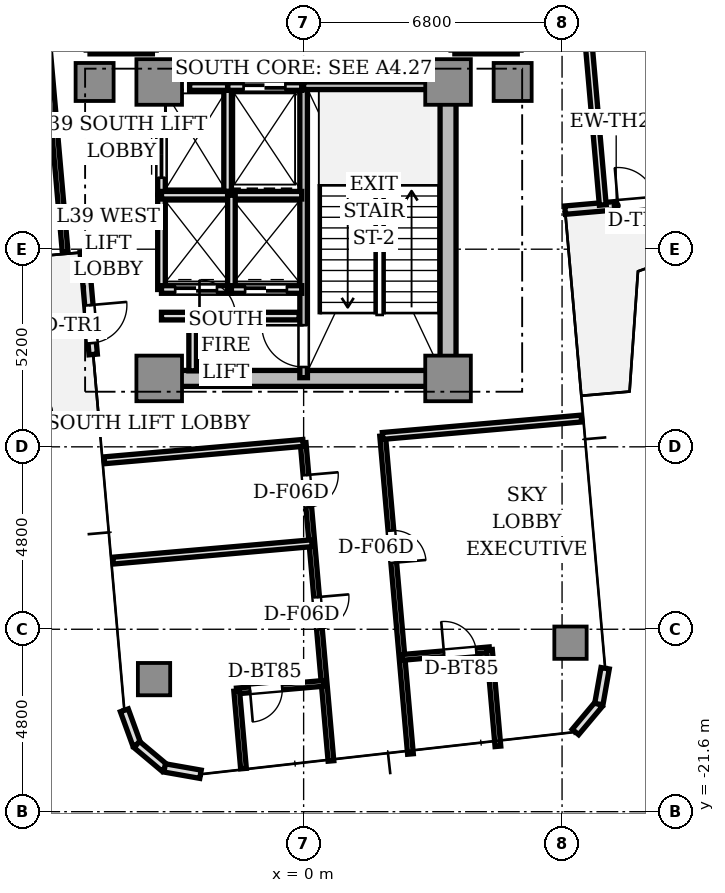
"""IFC4 building model, lengths in metres.
Left out: names, types, materials, properties, quantities, classifications, styles, units other than length and angle.
Written with IfcOpenShell. Run it as: python <this file> out.ifc"""

import sys

from ifc_helpers import new_model, si_unit, direction, frame, frame_2d, origin, origin_2d, place, context, subcontext, project, spatial, rectangle, extrude, source, transform, mapped, element, fill, save


model = new_model("IFC4")
c1 = context("Model", 3, precision=1e-05, world=origin(), true_north=direction((0.0, 1.0)))
c2 = subcontext(c1, "Body", "Model", "MODEL_VIEW")
j1 = project(units=[si_unit("LENGTHUNIT", "METRE"), si_unit("PLANEANGLEUNIT", "RADIAN")], contexts=[c1])
p1 = place(None, origin())
s1 = spatial("IfcSite", under=j1, at=p1, CompositionType="ELEMENT")
p2 = place(p1, origin())
s2 = spatial("IfcBuilding", under=s1, at=p2, CompositionType="ELEMENT")
p3 = place(p2, frame((0.0, 0.0, 142.75)))
s3 = spatial("IfcBuildingStorey", under=s2, at=p3, CompositionType="ELEMENT", Elevation=142.75)
p4 = place(p3, frame((-3.55, -10.2, 0.0), z_axis=(0.0, 0.0, 1.0), x_axis=(1.0, 0.0, 0.0)))
e1 = element("IfcWall", 1, at=p4, inside=s3, PredefinedType="SHEAR", context=c2, shape_type="SweptSolid", body=[
    extrude(rectangle(XDim=7.1, YDim=0.42, at=frame_2d((3.55, 0.0))), origin(), (0.0, 0.0, 1.0), 4.26),
])
p5 = place(p3, frame((3.8, -9.75, 0.0), z_axis=(0.0, 0.0, 1.0), x_axis=(0.0, 1.0, 0.0)))
e2 = element("IfcWall", 2, at=p5, inside=s3, PredefinedType="SHEAR", context=c2, shape_type="SweptSolid", body=[
    extrude(rectangle(XDim=6.9, YDim=0.42, at=frame_2d((3.45, 0.0))), origin(), (0.0, 0.0, 1.0), 4.26),
])
m1 = source(origin(), c2, "Body", "SweptSolid", [
    extrude(rectangle(XDim=1.2, YDim=1.2, at=origin_2d()), origin(), (0.0, 0.0, 1.0), 4.26),
])
for number, where, z_axis, x_axis in (
    (3, (-3.8, -2.4, 0.0), (0.0, 0.0, 1.0), (1.0, 0.0, 0.0)),
    (4, (3.8, -2.4, 0.0), (0.0, 0.0, 1.0), (1.0, 0.0, 0.0)),
    (5, (-3.8, -10.2, 0.0), (0.0, 0.0, 1.0), (1.0, 0.0, 0.0)),
    (6, (3.8, -10.2, 0.0), (0.0, 0.0, 1.0), (1.0, 0.0, 0.0)),
):
    element("IfcColumn", number, at=place(p3, frame(where, z_axis=z_axis, x_axis=x_axis)), inside=s3, PredefinedType="COLUMN", context=c2, shape_type="MappedRepresentation", body=[
        mapped(m1, transform((0.0, 0.0, 0.0), scale=1.0)),
    ])
m2 = source(origin(), c2, "Body", "SweptSolid", [
    extrude(rectangle(XDim=1.0, YDim=1.0, at=origin_2d()), origin(), (0.0, 0.0, 1.0), 4.26),
])
for number, where, z_axis, x_axis in (
    (7, (5.5, -2.4, 0.0), (0.0, 0.0, 1.0), (1.0, 0.0, 0.0)),
    (8, (-5.5, -2.4, 0.0), (0.0, 0.0, 1.0), (1.0, 0.0, 0.0)),
):
    element("IfcColumn", number, at=place(p3, frame(where, z_axis=z_axis, x_axis=x_axis)), inside=s3, PredefinedType="COLUMN", context=c2, shape_type="MappedRepresentation", body=[
        mapped(m2, transform((0.0, 0.0, 0.0), scale=1.0)),
    ])
m3 = source(origin(), c2, "Body", "SweptSolid", [
    extrude(rectangle(XDim=0.85, YDim=0.85, at=origin_2d()), origin(), (0.0, 0.0, 1.0), 4.26),
])
for number, where, z_axis, x_axis in (
    (9, (-3.936, -18.112, 0.0), (0.0, 0.0, 1.0), (1.0, 0.0, 0.0)),
    (10, (7.022, -17.153, 0.0), (0.0, 0.0, 1.0), (1.0, 0.0, 0.0)),
):
    element("IfcColumn", number, at=place(p3, frame(where, z_axis=z_axis, x_axis=x_axis)), inside=s3, PredefinedType="COLUMN", context=c2, shape_type="MappedRepresentation", body=[
        mapped(m3, transform((0.0, 0.0, 0.0), scale=1.0)),
    ])
p6 = place(p3, frame((6.879, -5.772, 0.0), z_axis=(0.0, 0.0, 1.0), x_axis=(0.996193619346, 0.087168071984, 0.0)))
e11 = element("IfcWall", 11, at=p6, inside=s3, PredefinedType="STANDARD", context=c2, shape_type="SweptSolid", body=[
    extrude(rectangle(XDim=2.7, YDim=0.22, at=frame_2d((1.35, 0.0))), origin(), (0.0, 0.0, 1.0), 4.26),
])
p7 = place(p6, frame((1.4, 0.0, 0.0)))
e12 = element("IfcOpeningElement", 12, at=p7, cuts=e11, PredefinedType="OPENING", context=c2, shape_type="SweptSolid", body=[
    extrude(rectangle(XDim=1.0, YDim=2.2, at=frame_2d((0.5, 1.1))), frame((0.0, 0.12, 0.0), z_axis=(0.0, -1.0, 0.0), x_axis=(1.0, 0.0, 0.0)), (0.0, 0.0, 1.0), 0.24),
])
p8 = place(p3, frame((-5.772, -6.879, 0.0), z_axis=(0.0, 0.0, 1.0), x_axis=(0.087168071984, -0.996193619346, 0.0)))
e13 = element("IfcWall", 13, at=p8, inside=s3, PredefinedType="STANDARD", context=c2, shape_type="SweptSolid", body=[
    extrude(rectangle(XDim=2.7, YDim=0.22, at=frame_2d((1.35, 0.0))), origin(), (0.0, 0.0, 1.0), 4.26),
])
p9 = place(p8, frame((1.4, 0.0, 0.0)))
e14 = element("IfcOpeningElement", 14, at=p9, cuts=e13, PredefinedType="OPENING", context=c2, shape_type="SweptSolid", body=[
    extrude(rectangle(XDim=1.0, YDim=2.2, at=frame_2d((0.5, 1.1))), frame((0.0, 0.12, 0.0), z_axis=(0.0, -1.0, 0.0), x_axis=(1.0, 0.0, 0.0)), (0.0, 0.0, 1.0), 0.24),
])
p10 = place(p3, frame((-4.718, -18.933, 0.0), z_axis=(0.0, 0.0, 1.0), x_axis=(0.34188635151, -0.939741306239, 0.0)))
e15 = element("IfcWall", 15, at=p10, inside=s3, PredefinedType="STANDARD", context=c2, shape_type="SweptSolid", body=[
    extrude(rectangle(XDim=0.958, YDim=0.22, at=frame_2d((0.479, 0.0))), origin(), (0.0, 0.0, 1.0), 4.26),
])
for number, where, z_axis, x_axis in (
    (16, (-4.39, -19.833, 0.0), (0.0, 0.0, 1.0), (0.766, -0.643, 0.0)),
    (17, (-3.657, -20.449, 0.0), (0.0, 0.0, 1.0), (0.985, -0.174, 0.0)),
):
    element("IfcWall", number, at=place(p3, frame(where, z_axis=z_axis, x_axis=x_axis)), inside=s3, PredefinedType="STANDARD", context=c2, shape_type="SweptSolid", body=[
        extrude(rectangle(XDim=0.958, YDim=0.22, at=frame_2d((0.479, 0.0))), origin(), (0.0, 0.0, 1.0), 4.26),
    ])
for number, where, z_axis, x_axis in (
    (18, (7.152, -19.503, 0.0), (0.0, 0.0, 1.0), (0.643, 0.766, 0.0)),
    (19, (7.768, -18.769, 0.0), (0.0, 0.0, 1.0), (0.174, 0.985, 0.0)),
):
    element("IfcWall", number, at=place(p3, frame(where, z_axis=z_axis, x_axis=x_axis)), inside=s3, PredefinedType="STANDARD", context=c2, shape_type="SweptSolid", body=[
        extrude(rectangle(XDim=0.958, YDim=0.22, at=frame_2d((0.479, 0.0))), origin(), (0.0, 0.0, 1.0), 4.26),
    ])
p11 = place(p3, frame((0.0, -10.18, 0.0), z_axis=(0.0, 0.0, 1.0), x_axis=(0.0, 1.0, 0.0)))
e20 = element("IfcWall", 20, at=p11, inside=s3, PredefinedType="SOLIDWALL", context=c2, shape_type="SweptSolid", body=[
    extrude(rectangle(XDim=7.68, YDim=0.2, at=frame_2d((3.84, 0.0))), origin(), (0.0, 0.0, 1.0), 4.26),
])
p12 = place(p11, frame((0.28, 0.0, 0.0)))
e21 = element("IfcOpeningElement", 21, at=p12, cuts=e20, PredefinedType="OPENING", context=c2, shape_type="SweptSolid", body=[
    extrude(rectangle(XDim=1.1, YDim=2.15, at=frame_2d((0.55, 1.075))), frame((0.0, 0.11, 0.0), z_axis=(0.0, -1.0, 0.0), x_axis=(1.0, 0.0, 0.0)), (0.0, 0.0, 1.0), 0.22),
])
p13 = place(p3, frame((0.0, -2.5, 0.0), z_axis=(0.0, 0.0, 1.0), x_axis=(1.0, 0.0, 0.0)))
e22 = element("IfcWall", 22, at=p13, inside=s3, PredefinedType="SOLIDWALL", context=c2, shape_type="SweptSolid", body=[
    extrude(rectangle(XDim=3.72, YDim=0.2, at=frame_2d((1.86, 0.0))), origin(), (0.0, 0.0, 1.0), 4.26),
])
p14 = place(p3, frame((-2.0, -5.28, 0.0), z_axis=(0.0, 0.0, 1.0), x_axis=(0.0, 1.0, 0.0)))
e23 = element("IfcWall", 23, at=p14, inside=s3, PredefinedType="SOLIDWALL", context=c2, shape_type="SweptSolid", body=[
    extrude(rectangle(XDim=2.78, YDim=0.2, at=frame_2d((1.39, 0.0))), origin(), (0.0, 0.0, 1.0), 3.81),
])
p15 = place(p3, frame((-2.0, -2.52, 0.0), z_axis=(0.0, 0.0, 1.0), x_axis=(1.0, 0.0, 0.0)))
e24 = element("IfcWall", 24, at=p15, inside=s3, PredefinedType="SOLIDWALL", context=c2, shape_type="SweptSolid", body=[
    extrude(rectangle(XDim=1.95, YDim=0.2, at=frame_2d((0.975, 0.0))), origin(), (0.0, 0.0, 1.0), 3.81),
])
p16 = place(p15, frame((0.42, 0.0, 0.0)))
e25 = element("IfcOpeningElement", 25, at=p16, cuts=e24, PredefinedType="OPENING", context=c2, shape_type="SweptSolid", body=[
    extrude(rectangle(XDim=1.1, YDim=2.2, at=frame_2d((0.55, 1.1))), frame((0.0, 0.11, 0.0), z_axis=(0.0, -1.0, 0.0), x_axis=(1.0, 0.0, 0.0)), (0.0, 0.0, 1.0), 0.22),
])
p17 = place(p3, frame((-3.0, -2.52, 0.0), z_axis=(0.0, 0.0, 1.0), x_axis=(1.0, 0.0, 0.0)))
e26 = element("IfcWall", 26, at=p17, inside=s3, PredefinedType="SOLIDWALL", context=c2, shape_type="SweptSolid", body=[
    extrude(rectangle(XDim=1.0, YDim=0.2, at=frame_2d((0.5, 0.0))), origin(), (0.0, 0.0, 1.0), 3.81),
])
p18 = place(p3, frame((-3.74, -5.36, 0.0), z_axis=(0.0, 0.0, 1.0), x_axis=(0.0, 1.0, 0.0)))
e27 = element("IfcWall", 27, at=p18, inside=s3, PredefinedType="SOLIDWALL", context=c2, shape_type="SweptSolid", body=[
    extrude(rectangle(XDim=2.08, YDim=0.2, at=frame_2d((1.04, 0.0))), origin(), (0.0, 0.0, 1.0), 3.81),
])
p19 = place(p18, frame((0.44, 0.0, 0.0)))
e28 = element("IfcOpeningElement", 28, at=p19, cuts=e27, PredefinedType="OPENING", context=c2, shape_type="SweptSolid", body=[
    extrude(rectangle(XDim=1.2, YDim=2.2, at=frame_2d((0.6, 1.1))), frame((0.0, 0.11, 0.0), z_axis=(0.0, -1.0, 0.0), x_axis=(1.0, 0.0, 0.0)), (0.0, 0.0, 1.0), 0.22),
])
p20 = place(p3, frame((-3.74, -7.86, 0.0), z_axis=(0.0, 0.0, 1.0), x_axis=(0.0, 1.0, 0.0)))
e29 = element("IfcWall", 29, at=p20, inside=s3, PredefinedType="SOLIDWALL", context=c2, shape_type="SweptSolid", body=[
    extrude(rectangle(XDim=2.48, YDim=0.2, at=frame_2d((1.24, 0.0))), origin(), (0.0, 0.0, 1.0), 3.81),
])
p21 = place(p3, frame((-3.74, -7.86, 0.0), z_axis=(0.0, 0.0, 1.0), x_axis=(1.0, 0.0, 0.0)))
e30 = element("IfcWall", 30, at=p21, inside=s3, PredefinedType="SOLIDWALL", context=c2, shape_type="SweptSolid", body=[
    extrude(rectangle(XDim=1.84, YDim=0.2, at=frame_2d((0.92, 0.0))), origin(), (0.0, 0.0, 1.0), 3.81),
])
p22 = place(p21, frame((0.36, 0.0, 0.0)))
e31 = element("IfcOpeningElement", 31, at=p22, cuts=e30, PredefinedType="OPENING", context=c2, shape_type="SweptSolid", body=[
    extrude(rectangle(XDim=1.1, YDim=2.2, at=frame_2d((0.55, 1.1))), frame((0.0, 0.11, 0.0), z_axis=(0.0, -1.0, 0.0), x_axis=(1.0, 0.0, 0.0)), (0.0, 0.0, 1.0), 0.22),
])
p23 = place(p3, frame((-3.74, -5.38, 0.0), z_axis=(0.0, 0.0, 1.0), x_axis=(1.0, 0.0, 0.0)))
e32 = element("IfcWall", 32, at=p23, inside=s3, PredefinedType="SOLIDWALL", context=c2, shape_type="SweptSolid", body=[
    extrude(rectangle(XDim=3.69, YDim=0.2, at=frame_2d((1.845, 0.0))), origin(), (0.0, 0.0, 1.0), 3.81),
])
p24 = place(p3, frame((-1.9, -7.86, 0.0), z_axis=(0.0, 0.0, 1.0), x_axis=(0.0, 1.0, 0.0)))
e33 = element("IfcWall", 33, at=p24, inside=s3, PredefinedType="SOLIDWALL", context=c2, shape_type="SweptSolid", body=[
    extrude(rectangle(XDim=2.48, YDim=0.2, at=frame_2d((1.24, 0.0))), origin(), (0.0, 0.0, 1.0), 3.81),
])
p25 = place(p3, frame((-1.9, -7.86, 0.0), z_axis=(0.0, 0.0, 1.0), x_axis=(1.0, 0.0, 0.0)))
e34 = element("IfcWall", 34, at=p25, inside=s3, PredefinedType="SOLIDWALL", context=c2, shape_type="SweptSolid", body=[
    extrude(rectangle(XDim=1.85, YDim=0.2, at=frame_2d((0.925, 0.0))), origin(), (0.0, 0.0, 1.0), 3.81),
])
p26 = place(p25, frame((0.36, 0.0, 0.0)))
e35 = element("IfcOpeningElement", 35, at=p26, cuts=e34, PredefinedType="OPENING", context=c2, shape_type="SweptSolid", body=[
    extrude(rectangle(XDim=1.1, YDim=2.2, at=frame_2d((0.55, 1.1))), frame((0.0, 0.11, 0.0), z_axis=(0.0, -1.0, 0.0), x_axis=(1.0, 0.0, 0.0)), (0.0, 0.0, 1.0), 0.22),
])
for number, where, z_axis, x_axis in (
    (36, (3.98, -1.56, 0.0), (0.0, 0.0, 1.0), (1.0, 0.0, 0.0)),
    (37, (-5.62, -1.56, 0.0), (0.0, 0.0, 1.0), (1.0, 0.0, 0.0)),
):
    element("IfcWall", number, at=place(p3, frame(where, z_axis=z_axis, x_axis=x_axis)), inside=s3, PredefinedType="SOLIDWALL", context=c2, shape_type="SweptSolid", body=[
        extrude(rectangle(XDim=1.64, YDim=0.2, at=frame_2d((0.82, 0.0))), origin(), (0.0, 0.0, 1.0), 3.81),
    ])
p27 = place(p3, frame((-3.74, -8.56, 0.0), z_axis=(0.0, 0.0, 1.0), x_axis=(1.0, 0.0, 0.0)))
e38 = element("IfcWall", 38, at=p27, inside=s3, PredefinedType="SOLIDWALL", context=c2, shape_type="SweptSolid", body=[
    extrude(rectangle(XDim=3.62, YDim=0.2, at=frame_2d((1.81, 0.0))), origin(), (0.0, 0.0, 1.0), 3.81),
])
p28 = place(p27, frame((1.0, 0.0, 0.0)))
e39 = element("IfcOpeningElement", 39, at=p28, cuts=e38, PredefinedType="OPENING", context=c2, shape_type="SweptSolid", body=[
    extrude(rectangle(XDim=0.95, YDim=2.15, at=frame_2d((0.475, 1.075))), frame((0.0, 0.11, 0.0), z_axis=(0.0, -1.0, 0.0), x_axis=(1.0, 0.0, 0.0)), (0.0, 0.0, 1.0), 0.22),
])
p29 = place(p3, frame((-2.92, -10.0, 0.0), z_axis=(0.0, 0.0, 1.0), x_axis=(0.0, 1.0, 0.0)))
e40 = element("IfcWall", 40, at=p29, inside=s3, PredefinedType="SOLIDWALL", context=c2, shape_type="SweptSolid", body=[
    extrude(rectangle(XDim=1.44, YDim=0.2, at=frame_2d((0.72, 0.0))), origin(), (0.0, 0.0, 1.0), 3.81),
])
p30 = place(p3, frame((7.871, -5.635, 0.0), z_axis=(0.0, 0.0, 1.0), x_axis=(-0.087147336495, 0.996195433508, 0.0)))
e41 = element("IfcWall", 41, at=p30, inside=s3, PredefinedType="PARTITIONING", context=c2, shape_type="SweptSolid", body=[
    extrude(rectangle(XDim=5.25, YDim=0.18, at=frame_2d((2.625, 0.0))), origin(), (0.0, 0.0, 1.0), 3.81),
])
p31 = place(p3, frame((-7.373, 5.679, 0.0), z_axis=(0.0, 0.0, 1.0), x_axis=(0.087154691724, -0.996194790044, 0.0)))
e42 = element("IfcWall", 42, at=p31, inside=s3, PredefinedType="PARTITIONING", context=c2, shape_type="SweptSolid", body=[
    extrude(rectangle(XDim=12.6, YDim=0.15, at=frame_2d((6.3, 0.0))), origin(), (0.0, 0.0, 1.0), 3.81),
])
p32 = place(p31, frame((5.5, 0.0, 0.0)))
e43 = element("IfcOpeningElement", 43, at=p32, cuts=e42, PredefinedType="OPENING", context=c2, shape_type="SweptSolid", body=[
    extrude(rectangle(XDim=1.6, YDim=2.25, at=frame_2d((0.8, 1.125))), frame((0.0, 0.085, 0.0), z_axis=(0.0, -1.0, 0.0), x_axis=(1.0, 0.0, 0.0)), (0.0, 0.0, 1.0), 0.17),
])
p33 = place(p3, frame((2.079, -11.713, 0.0), z_axis=(0.0, 0.0, 1.0), x_axis=(0.087136303517, -0.996196398613, 0.0)))
e44 = element("IfcWall", 44, at=p33, inside=s3, PredefinedType="PARTITIONING", context=c2, shape_type="SweptSolid", body=[
    extrude(rectangle(XDim=8.4, YDim=0.15, at=frame_2d((4.2, 0.0))), origin(), (0.0, 0.0, 1.0), 3.81),
])
p34 = place(p33, frame((2.5, 0.0, 0.0)))
e45 = element("IfcOpeningElement", 45, at=p34, cuts=e44, PredefinedType="OPENING", context=c2, shape_type="SweptSolid", body=[
    extrude(rectangle(XDim=0.85, YDim=2.1, at=frame_2d((0.425, 1.05))), frame((0.0, 0.085, 0.0), z_axis=(0.0, -1.0, 0.0), x_axis=(1.0, 0.0, 0.0)), (0.0, 0.0, 1.0), 0.17),
])
p35 = place(p3, frame((-0.013, -11.896, 0.0), z_axis=(0.0, 0.0, 1.0), x_axis=(0.087165147537, -0.996193875235, 0.0)))
e46 = element("IfcWall", 46, at=p35, inside=s3, PredefinedType="PARTITIONING", context=c2, shape_type="SweptSolid", body=[
    extrude(rectangle(XDim=8.4, YDim=0.15, at=frame_2d((4.2, 0.0))), origin(), (0.0, 0.0, 1.0), 3.81),
])
p36 = place(p35, frame((0.85, 0.0, 0.0)))
e47 = element("IfcOpeningElement", 47, at=p36, cuts=e46, PredefinedType="OPENING", context=c2, shape_type="SweptSolid", body=[
    extrude(rectangle(XDim=0.85, YDim=2.1, at=frame_2d((0.425, 1.05))), frame((0.0, 0.085, 0.0), z_axis=(0.0, -1.0, 0.0), x_axis=(1.0, 0.0, 0.0)), (0.0, 0.0, 1.0), 0.17),
])
p37 = place(p35, frame((4.075, 0.0, 0.0)))
e48 = element("IfcOpeningElement", 48, at=p37, cuts=e46, PredefinedType="OPENING", context=c2, shape_type="SweptSolid", body=[
    extrude(rectangle(XDim=0.85, YDim=2.1, at=frame_2d((0.425, 1.05))), frame((0.0, 0.085, 0.0), z_axis=(0.0, -1.0, 0.0), x_axis=(1.0, 0.0, 0.0)), (0.0, 0.0, 1.0), 0.17),
])
for number, where, z_axis, x_axis in (
    (49, (2.079, -11.713, 0.0), (0.0, 0.0, 1.0), (0.996, 0.087, 0.0)),
    (50, (-5.243, -12.354, 0.0), (0.0, 0.0, 1.0), (0.996, 0.087, 0.0)),
):
    element("IfcWall", number, at=place(p3, frame(where, z_axis=z_axis, x_axis=x_axis)), inside=s3, PredefinedType="PARTITIONING", context=c2, shape_type="SweptSolid", body=[
        extrude(rectangle(XDim=5.25, YDim=0.18, at=frame_2d((2.625, 0.0))), origin(), (0.0, 0.0, 1.0), 3.78),
    ])
p38 = place(p3, frame((2.589, -17.541, 0.0), z_axis=(0.0, 0.0, 1.0), x_axis=(0.99620082659, 0.087085665299, 0.0)))
e51 = element("IfcWall", 51, at=p38, inside=s3, PredefinedType="PARTITIONING", context=c2, shape_type="SweptSolid", body=[
    extrude(rectangle(XDim=2.31, YDim=0.15, at=frame_2d((1.155, 0.0))), origin(), (0.0, 0.0, 1.0), 3.78),
])
p39 = place(p38, frame((1.11, 0.0, 0.0)))
e52 = element("IfcOpeningElement", 52, at=p39, cuts=e51, PredefinedType="OPENING", context=c2, shape_type="SweptSolid", body=[
    extrude(rectangle(XDim=0.85, YDim=2.1, at=frame_2d((0.425, 1.05))), frame((0.0, 0.085, 0.0), z_axis=(0.0, -1.0, 0.0), x_axis=(1.0, 0.0, 0.0)), (0.0, 0.0, 1.0), 0.17),
])
p40 = place(p3, frame((4.89, -17.34, 0.0), z_axis=(0.0, 0.0, 1.0), x_axis=(0.087125381265, -0.996197353911, 0.0)))
e53 = element("IfcWall", 53, at=p40, inside=s3, PredefinedType="PARTITIONING", context=c2, shape_type="SweptSolid", body=[
    extrude(rectangle(XDim=2.55, YDim=0.15, at=frame_2d((1.275, 0.0))), origin(), (0.0, 0.0, 1.0), 3.81),
])
p41 = place(p3, frame((0.218, -14.536, 0.0), z_axis=(0.0, 0.0, 1.0), x_axis=(-0.996195433508, -0.087147336495, 0.0)))
e54 = element("IfcWall", 54, at=p41, inside=s3, PredefinedType="PARTITIONING", context=c2, shape_type="SweptSolid", body=[
    extrude(rectangle(XDim=5.25, YDim=0.18, at=frame_2d((2.625, 0.0))), origin(), (0.0, 0.0, 1.0), 3.81),
])
p42 = place(p3, frame((0.54, -18.222, 0.0), z_axis=(0.0, 0.0, 1.0), x_axis=(-0.99620082659, -0.087085665299, 0.0)))
e55 = element("IfcWall", 55, at=p42, inside=s3, PredefinedType="PARTITIONING", context=c2, shape_type="SweptSolid", body=[
    extrude(rectangle(XDim=2.31, YDim=0.15, at=frame_2d((1.155, 0.0))), origin(), (0.0, 0.0, 1.0), 3.81),
])
p43 = place(p42, frame((1.11, 0.0, 0.0)))
e56 = element("IfcOpeningElement", 56, at=p43, cuts=e55, PredefinedType="OPENING", context=c2, shape_type="SweptSolid", body=[
    extrude(rectangle(XDim=0.85, YDim=2.1, at=frame_2d((0.425, 1.05))), frame((0.0, 0.085, 0.0), z_axis=(0.0, -1.0, 0.0), x_axis=(1.0, 0.0, 0.0)), (0.0, 0.0, 1.0), 0.17),
])
p44 = place(p3, frame((-1.761, -18.424, 0.0), z_axis=(0.0, 0.0, 1.0), x_axis=(0.087174336889, -0.99619307114, 0.0)))
e57 = element("IfcWall", 57, at=p44, inside=s3, PredefinedType="PARTITIONING", context=c2, shape_type="SweptSolid", body=[
    extrude(rectangle(XDim=2.05, YDim=0.15, at=frame_2d((1.025, 0.0))), origin(), (0.0, 0.0, 1.0), 3.81),
])
m4 = source(origin(), c2, "Body", "SweptSolid", [
    extrude(rectangle(XDim=1.0, YDim=0.05, at=origin_2d()), origin(), (0.0, 0.0, 1.0), 2.2),
])
p45 = place(p7, frame((0.5, 0.0, 0.0)))
e58 = element("IfcDoor", 58, at=p45, inside=s3, OperationType="SINGLE_SWING_LEFT", PredefinedType="DOOR", context=c2, shape_type="MappedRepresentation", body=[
    mapped(m4, transform((0.0, 0.0, 0.0), scale=1.0)),
])
fill(e12, e58)
p46 = place(p9, frame((0.5, 0.0, 0.0)))
e59 = element("IfcDoor", 59, at=p46, inside=s3, OperationType="SINGLE_SWING_LEFT", PredefinedType="DOOR", context=c2, shape_type="MappedRepresentation", body=[
    mapped(m4, transform((0.0, 0.0, 0.0), scale=1.0)),
])
fill(e14, e59)
m5 = source(origin(), c2, "Body", "SweptSolid", [
    extrude(rectangle(XDim=1.1, YDim=0.05, at=origin_2d()), origin(), (0.0, 0.0, 1.0), 2.2),
])
p47 = place(p16, frame((0.55, 0.0, 0.0)))
e60 = element("IfcDoor", 60, at=p47, inside=s3, OperationType="DOUBLE_DOOR_SLIDING", PredefinedType="DOOR", context=c2, shape_type="MappedRepresentation", body=[
    mapped(m5, transform((0.0, 0.0, 0.0), scale=1.0)),
])
fill(e25, e60)
m6 = source(origin(), c2, "Body", "SweptSolid", [
    extrude(rectangle(XDim=1.2, YDim=0.05, at=origin_2d()), origin(), (0.0, 0.0, 1.0), 2.2),
])
p48 = place(p19, frame((0.6, 0.0, 0.0)))
e61 = element("IfcDoor", 61, at=p48, inside=s3, OperationType="DOUBLE_DOOR_SLIDING", PredefinedType="DOOR", context=c2, shape_type="MappedRepresentation", body=[
    mapped(m6, transform((0.0, 0.0, 0.0), scale=1.0)),
])
fill(e28, e61)
p49 = place(p22, frame((0.55, 0.0, 0.0)))
e62 = element("IfcDoor", 62, at=p49, inside=s3, OperationType="DOUBLE_DOOR_SLIDING", PredefinedType="DOOR", context=c2, shape_type="MappedRepresentation", body=[
    mapped(m5, transform((0.0, 0.0, 0.0), scale=1.0)),
])
fill(e31, e62)
p50 = place(p26, frame((0.55, 0.0, 0.0)))
e63 = element("IfcDoor", 63, at=p50, inside=s3, OperationType="DOUBLE_DOOR_SLIDING", PredefinedType="DOOR", context=c2, shape_type="MappedRepresentation", body=[
    mapped(m5, transform((0.0, 0.0, 0.0), scale=1.0)),
])
fill(e35, e63)
m7 = source(origin(), c2, "Body", "SweptSolid", [
    extrude(rectangle(XDim=1.1, YDim=0.05, at=origin_2d()), origin(), (0.0, 0.0, 1.0), 2.15),
])
p51 = place(p12, frame((0.55, 0.0, 0.0)))
e64 = element("IfcDoor", 64, at=p51, inside=s3, OperationType="SINGLE_SWING_RIGHT", PredefinedType="DOOR", context=c2, shape_type="MappedRepresentation", body=[
    mapped(m7, transform((0.0, 0.0, 0.0), scale=1.0)),
])
fill(e21, e64)
m8 = source(origin(), c2, "Body", "SweptSolid", [
    extrude(rectangle(XDim=0.95, YDim=0.05, at=origin_2d()), origin(), (0.0, 0.0, 1.0), 2.15),
])
p52 = place(p28, frame((0.475, 0.0, 0.0)))
e65 = element("IfcDoor", 65, at=p52, inside=s3, OperationType="SINGLE_SWING_LEFT", PredefinedType="DOOR", context=c2, shape_type="MappedRepresentation", body=[
    mapped(m8, transform((0.0, 0.0, 0.0), scale=1.0)),
])
fill(e39, e65)
m9 = source(origin(), c2, "Body", "SweptSolid", [
    extrude(rectangle(XDim=0.85, YDim=0.05, at=origin_2d()), origin(), (0.0, 0.0, 1.0), 2.1),
])
p53 = place(p39, frame((0.425, 0.0, 0.0)))
e66 = element("IfcDoor", 66, at=p53, inside=s3, OperationType="SINGLE_SWING_LEFT", PredefinedType="DOOR", context=c2, shape_type="MappedRepresentation", body=[
    mapped(m9, transform((0.0, 0.0, 0.0), scale=1.0)),
])
fill(e52, e66)
p54 = place(p34, frame((0.425, 0.0, 0.0)))
e67 = element("IfcDoor", 67, at=p54, inside=s3, OperationType="SINGLE_SWING_RIGHT", PredefinedType="DOOR", context=c2, shape_type="MappedRepresentation", body=[
    mapped(m9, transform((0.0, 0.0, 0.0), scale=1.0)),
])
fill(e45, e67)
p55 = place(p36, frame((0.425, 0.0, 0.0)))
e68 = element("IfcDoor", 68, at=p55, inside=s3, OperationType="SINGLE_SWING_LEFT", PredefinedType="DOOR", context=c2, shape_type="MappedRepresentation", body=[
    mapped(m9, transform((0.0, 0.0, 0.0), scale=1.0)),
])
fill(e47, e68)
p56 = place(p43, frame((0.425, 0.0, 0.0)))
e69 = element("IfcDoor", 69, at=p56, inside=s3, OperationType="SINGLE_SWING_RIGHT", PredefinedType="DOOR", context=c2, shape_type="MappedRepresentation", body=[
    mapped(m9, transform((0.0, 0.0, 0.0), scale=1.0)),
])
fill(e56, e69)
p57 = place(p37, frame((0.425, 0.0, 0.0)))
e70 = element("IfcDoor", 70, at=p57, inside=s3, OperationType="SINGLE_SWING_LEFT", PredefinedType="DOOR", context=c2, shape_type="MappedRepresentation", body=[
    mapped(m9, transform((0.0, 0.0, 0.0), scale=1.0)),
])
fill(e48, e70)
save(model, sys.argv[1])
